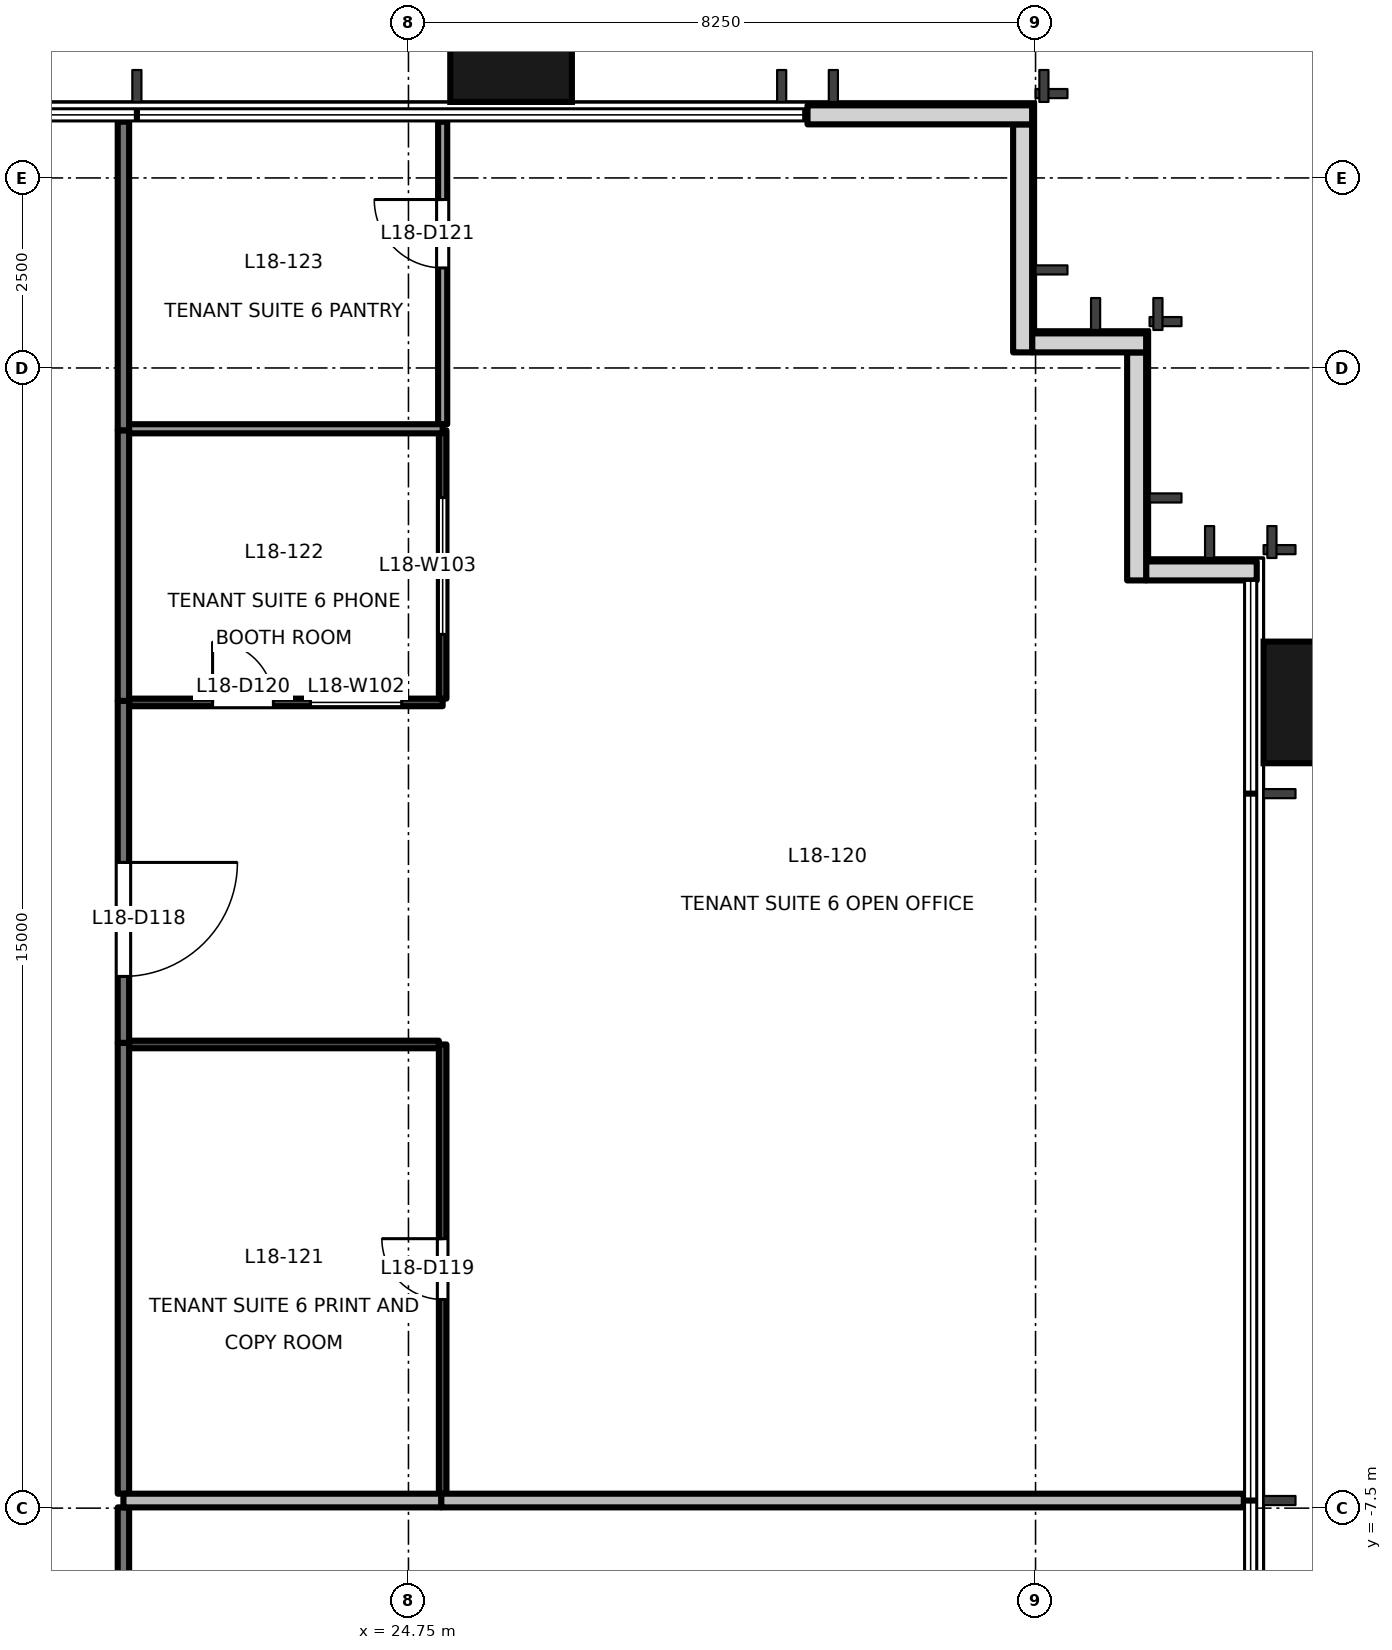
"""IFC4 building model, lengths in metres.
Left out: names, types, materials, properties, quantities, classifications, styles, units other than length and angle.
Written with IfcOpenShell. Run it as: python <this file> out.ifc"""

import sys

from ifc_helpers import new_model, si_unit, direction, frame, frame_2d, origin, origin_2d, place, context, subcontext, project, spatial, rectangle, extrude, element, fill, save


model = new_model("IFC4")
c1 = context("Model", 3, precision=1e-05, world=origin(), true_north=direction((0.0, 1.0)))
c2 = subcontext(c1, "Body", "Model", "MODEL_VIEW")
j1 = project(units=[si_unit("LENGTHUNIT", "METRE"), si_unit("PLANEANGLEUNIT", "RADIAN")], contexts=[c1])
p1 = place(None, origin())
s1 = spatial("IfcSite", under=j1, at=p1, CompositionType="ELEMENT")
p2 = place(p1, origin())
s2 = spatial("IfcBuilding", under=s1, at=p2, CompositionType="ELEMENT")
p3 = place(p2, frame((0.0, 0.0, 83.7)))
s3 = spatial("IfcBuildingStorey", under=s2, at=p3, CompositionType="ELEMENT", Elevation=83.7)
for number, where, z_axis, x_axis in (
    (1, (36.9, 3.1, -0.2), (0.0, 0.0, 1.0), (0.0, 1.0, 0.0)),
    (2, (26.1, 11.9, -0.2), (0.0, 0.0, 1.0), (1.0, 0.0, 0.0)),
):
    element("IfcColumn", number, at=place(p3, frame(where, z_axis=z_axis, x_axis=x_axis)), inside=s3, PredefinedType="COLUMN", context=c2, shape_type="SweptSolid", body=[
        extrude(rectangle(XDim=1.6, YDim=1.8, at=origin_2d()), origin(), (0.0, 0.0, 1.0), 4.0),
    ])
p4 = place(p3, frame((35.91, 4.83, 0.0), z_axis=(0.0, 0.0, 1.0), x_axis=(-1.0, 0.0, 0.0)))
e3 = element("IfcWall", 3, at=p4, inside=s3, PredefinedType="SOLIDWALL", context=c2, shape_type="SweptSolid", body=[
    extrude(rectangle(XDim=1.455, YDim=0.25, at=frame_2d((0.728, 0.0))), origin(), (0.0, 0.0, 1.0), 3.8),
])
p5 = place(p3, frame((34.33, 4.705, 0.0), z_axis=(0.0, 0.0, 1.0), x_axis=(0.0, 1.0, 0.0)))
e4 = element("IfcWall", 4, at=p5, inside=s3, PredefinedType="SOLIDWALL", context=c2, shape_type="SweptSolid", body=[
    extrude(rectangle(XDim=3.0, YDim=0.25, at=frame_2d((1.5, 0.0))), origin(), (0.0, 0.0, 1.0), 3.8),
])
p6 = place(p3, frame((34.455, 7.83, 0.0), z_axis=(0.0, 0.0, 1.0), x_axis=(-1.0, 0.0, 0.0)))
e5 = element("IfcWall", 5, at=p6, inside=s3, PredefinedType="SOLIDWALL", context=c2, shape_type="SweptSolid", body=[
    extrude(rectangle(XDim=1.5, YDim=0.25, at=frame_2d((0.75, 0.0))), origin(), (0.0, 0.0, 1.0), 3.8),
])
p7 = place(p3, frame((32.83, 7.705, 0.0), z_axis=(0.0, 0.0, 1.0), x_axis=(0.0, 1.0, 0.0)))
e6 = element("IfcWall", 6, at=p7, inside=s3, PredefinedType="SOLIDWALL", context=c2, shape_type="SweptSolid", body=[
    extrude(rectangle(XDim=3.0, YDim=0.25, at=frame_2d((1.5, 0.0))), origin(), (0.0, 0.0, 1.0), 3.8),
])
p8 = place(p3, frame((32.955, 10.83, 0.0), z_axis=(0.0, 0.0, 1.0), x_axis=(-1.0, 0.0, 0.0)))
e7 = element("IfcWall", 7, at=p8, inside=s3, PredefinedType="SOLIDWALL", context=c2, shape_type="SweptSolid", body=[
    extrude(rectangle(XDim=2.955, YDim=0.25, at=frame_2d((1.478, 0.0))), origin(), (0.0, 0.0, 1.0), 3.8),
])
p9 = place(p3, frame((21.0, -7.49, 0.0), z_axis=(0.0, 0.0, 1.0), x_axis=(0.0, -1.0, 0.0)))
e8 = element("IfcWall", 8, at=p9, inside=s3, PredefinedType="PARTITIONING", context=c2, shape_type="SweptSolid", body=[
    extrude(rectangle(XDim=3.61, YDim=0.15, at=frame_2d((1.805, 0.0))), origin(), (0.0, 0.0, 1.0), 2.9),
])
p10 = place(p9, frame((1.458, 0.0, 0.0)))
e9 = element("IfcOpeningElement", 9, at=p10, cuts=e8, PredefinedType="OPENING", context=c2, shape_type="SweptSolid", body=[
    extrude(rectangle(XDim=1.5, YDim=2.1, at=frame_2d((0.75, 1.05))), frame((0.0, 0.085, 0.0), z_axis=(0.0, -1.0, 0.0), x_axis=(1.0, 0.0, 0.0)), (0.0, 0.0, 1.0), 0.171),
])
p11 = place(p3, frame((21.0, 3.12, 0.0), z_axis=(0.0, 0.0, 1.0), x_axis=(0.0, -1.0, 0.0)))
e10 = element("IfcWall", 10, at=p11, inside=s3, PredefinedType="PARTITIONING", context=c2, shape_type="SweptSolid", body=[
    extrude(rectangle(XDim=4.5, YDim=0.15, at=frame_2d((2.25, 0.0))), origin(), (0.0, 0.0, 1.0), 2.9),
])
p12 = place(p11, frame((2.125, 0.0, 0.0)))
e11 = element("IfcOpeningElement", 11, at=p12, cuts=e10, PredefinedType="OPENING", context=c2, shape_type="SweptSolid", body=[
    extrude(rectangle(XDim=1.5, YDim=2.1, at=frame_2d((0.75, 1.05))), frame((0.0, 0.085, 0.0), z_axis=(0.0, -1.0, 0.0), x_axis=(1.0, 0.0, 0.0)), (0.0, 0.0, 1.0), 0.171),
])
p13 = place(p3, frame((21.0, -1.38, 0.0), z_axis=(0.0, 0.0, 1.0), x_axis=(0.0, -1.0, 0.0)))
e12 = element("IfcWall", 12, at=p13, inside=s3, PredefinedType="PARTITIONING", context=c2, shape_type="SweptSolid", body=[
    extrude(rectangle(XDim=5.93, YDim=0.15, at=frame_2d((2.965, 0.0))), origin(), (0.0, 0.0, 1.0), 2.9),
])
p14 = place(p3, frame((21.0, 6.68, 0.0), z_axis=(0.0, 0.0, 1.0), x_axis=(0.0, -1.0, 0.0)))
e13 = element("IfcWall", 13, at=p14, inside=s3, PredefinedType="PARTITIONING", context=c2, shape_type="SweptSolid", body=[
    extrude(rectangle(XDim=3.56, YDim=0.15, at=frame_2d((1.78, 0.0))), origin(), (0.0, 0.0, 1.0), 2.9),
])
p15 = place(p3, frame((21.0, 10.74, 0.0), z_axis=(0.0, 0.0, 1.0), x_axis=(0.0, -1.0, 0.0)))
e14 = element("IfcWall", 14, at=p15, inside=s3, PredefinedType="PARTITIONING", context=c2, shape_type="SweptSolid", body=[
    extrude(rectangle(XDim=4.06, YDim=0.15, at=frame_2d((2.03, 0.0))), origin(), (0.0, 0.0, 1.0), 3.8),
])
p16 = place(p3, frame((25.18, -7.4, 0.0), z_axis=(0.0, 0.0, 1.0), x_axis=(1.0, 0.0, 0.0)))
e15 = element("IfcWall", 15, at=p16, inside=s3, PredefinedType="PARTITIONING", context=c2, shape_type="SweptSolid", body=[
    extrude(rectangle(XDim=10.56, YDim=0.18, at=frame_2d((5.28, 0.0))), origin(), (0.0, 0.0, 1.0), 3.8),
])
p17 = place(p3, frame((21.0, -7.4, 0.0), z_axis=(0.0, 0.0, 1.0), x_axis=(1.0, 0.0, 0.0)))
e16 = element("IfcWall", 16, at=p17, inside=s3, PredefinedType="PARTITIONING", context=c2, shape_type="SweptSolid", body=[
    extrude(rectangle(XDim=4.18, YDim=0.18, at=frame_2d((2.09, 0.0))), origin(), (0.0, 0.0, 1.0), 3.8),
])
p18 = place(p3, frame((25.15, -1.4, 0.0), z_axis=(0.0, 0.0, 1.0), x_axis=(-1.0, 0.0, 0.0)))
e17 = element("IfcWall", 17, at=p18, inside=s3, PredefinedType="PARTITIONING", context=c2, shape_type="SweptSolid", body=[
    extrude(rectangle(XDim=4.075, YDim=0.1, at=frame_2d((2.038, 0.0))), origin(), (0.0, 0.0, 1.0), 3.8),
])
p19 = place(p3, frame((25.2, -7.31, 0.0), z_axis=(0.0, 0.0, 1.0), x_axis=(0.0, 1.0, 0.0)))
e18 = element("IfcWall", 18, at=p19, inside=s3, PredefinedType="PARTITIONING", context=c2, shape_type="SweptSolid", body=[
    extrude(rectangle(XDim=5.91, YDim=0.1, at=frame_2d((2.955, 0.0))), origin(), (0.0, 0.0, 1.0), 2.9),
])
p20 = place(p19, frame((2.555, 0.0, 0.0)))
e19 = element("IfcOpeningElement", 19, at=p20, cuts=e18, PredefinedType="OPENING", context=c2, shape_type="SweptSolid", body=[
    extrude(rectangle(XDim=0.8, YDim=2.1, at=frame_2d((0.4, 1.05))), frame((0.0, 0.061, 0.0), z_axis=(0.0, -1.0, 0.0), x_axis=(1.0, 0.0, 0.0)), (0.0, 0.0, 1.0), 0.121),
])
p21 = place(p3, frame((21.075, 3.1, 0.0), z_axis=(0.0, 0.0, 1.0), x_axis=(1.0, 0.0, 0.0)))
e20 = element("IfcWall", 20, at=p21, inside=s3, PredefinedType="PARTITIONING", context=c2, shape_type="SweptSolid", body=[
    extrude(rectangle(XDim=4.125, YDim=0.1, at=frame_2d((2.062, 0.0))), origin(), (0.0, 0.0, 1.0), 3.8),
])
p22 = place(p21, frame((1.098, 0.0, 0.0)))
e21 = element("IfcOpeningElement", 21, at=p22, cuts=e20, PredefinedType="OPENING", context=c2, shape_type="SweptSolid", body=[
    extrude(rectangle(XDim=0.8, YDim=2.1, at=frame_2d((0.4, 1.05))), frame((0.0, 0.061, 0.0), z_axis=(0.0, -1.0, 0.0), x_axis=(1.0, 0.0, 0.0)), (0.0, 0.0, 1.0), 0.121),
])
p23 = place(p21, frame((2.386, 0.0, 0.9)))
e22 = element("IfcOpeningElement", 22, at=p23, cuts=e20, PredefinedType="OPENING", context=c2, shape_type="SweptSolid", body=[
    extrude(rectangle(XDim=1.2, YDim=1.2, at=frame_2d((0.6, 0.6))), frame((0.0, 0.061, 0.0), z_axis=(0.0, -1.0, 0.0), x_axis=(1.0, 0.0, 0.0)), (0.0, 0.0, 1.0), 0.121),
])
p24 = place(p3, frame((25.2, 3.15, 0.0), z_axis=(0.0, 0.0, 1.0), x_axis=(0.0, 1.0, 0.0)))
e23 = element("IfcWall", 23, at=p24, inside=s3, PredefinedType="PARTITIONING", context=c2, shape_type="SweptSolid", body=[
    extrude(rectangle(XDim=3.53, YDim=0.1, at=frame_2d((1.765, 0.0))), origin(), (0.0, 0.0, 1.0), 2.9),
])
p25 = place(p24, frame((0.845, 0.0, 0.9)))
e24 = element("IfcOpeningElement", 24, at=p25, cuts=e23, PredefinedType="OPENING", context=c2, shape_type="SweptSolid", body=[
    extrude(rectangle(XDim=1.8, YDim=1.2, at=frame_2d((0.9, 0.6))), frame((0.0, 0.061, 0.0), z_axis=(0.0, -1.0, 0.0), x_axis=(1.0, 0.0, 0.0)), (0.0, 0.0, 1.0), 0.121),
])
p26 = place(p3, frame((25.2, 6.76, 0.0), z_axis=(0.0, 0.0, 1.0), x_axis=(0.0, 1.0, 0.0)))
e25 = element("IfcWall", 25, at=p26, inside=s3, PredefinedType="PARTITIONING", context=c2, shape_type="SweptSolid", body=[
    extrude(rectangle(XDim=3.98, YDim=0.12, at=frame_2d((1.99, 0.0))), origin(), (0.0, 0.0, 1.0), 3.8),
])
p27 = place(p26, frame((2.056, 0.0, 0.0)))
e26 = element("IfcOpeningElement", 26, at=p27, cuts=e25, PredefinedType="OPENING", context=c2, shape_type="SweptSolid", body=[
    extrude(rectangle(XDim=0.9, YDim=2.1, at=frame_2d((0.45, 1.05))), frame((0.0, 0.071, 0.0), z_axis=(0.0, -1.0, 0.0), x_axis=(1.0, 0.0, 0.0)), (0.0, 0.0, 1.0), 0.141),
])
p28 = place(p3, frame((21.075, 6.7, 0.0), z_axis=(0.0, 0.0, 1.0), x_axis=(1.0, 0.0, 0.0)))
e27 = element("IfcWall", 27, at=p28, inside=s3, PredefinedType="PARTITIONING", context=c2, shape_type="SweptSolid", body=[
    extrude(rectangle(XDim=4.125, YDim=0.12, at=frame_2d((2.062, 0.0))), origin(), (0.0, 0.0, 1.0), 3.8),
])
p29 = place(p12, origin())
e28 = element("IfcDoor", 28, at=p29, inside=s3, OperationType="DOUBLE_DOOR_SINGLE_SWING", PredefinedType="DOOR", context=c2, shape_type="SweptSolid", body=[
    extrude(rectangle(XDim=1.5, YDim=2.1, at=frame_2d((0.75, 1.05))), frame((0.0, 0.025, 0.0), z_axis=(0.0, -1.0, 0.0), x_axis=(1.0, 0.0, 0.0)), (0.0, 0.0, 1.0), 0.05),
])
fill(e11, e28)
p30 = place(p20, origin())
e29 = element("IfcDoor", 29, at=p30, inside=s3, OperationType="SINGLE_SWING_RIGHT", PredefinedType="DOOR", context=c2, shape_type="SweptSolid", body=[
    extrude(rectangle(XDim=0.8, YDim=2.1, at=frame_2d((0.4, 1.05))), frame((0.0, 0.025, 0.0), z_axis=(0.0, -1.0, 0.0), x_axis=(1.0, 0.0, 0.0)), (0.0, 0.0, 1.0), 0.05),
])
fill(e19, e29)
p31 = place(p22, origin())
e30 = element("IfcDoor", 30, at=p31, inside=s3, OperationType="SINGLE_SWING_LEFT", PredefinedType="DOOR", context=c2, shape_type="SweptSolid", body=[
    extrude(rectangle(XDim=0.8, YDim=2.1, at=frame_2d((0.4, 1.05))), frame((0.0, 0.025, 0.0), z_axis=(0.0, -1.0, 0.0), x_axis=(1.0, 0.0, 0.0)), (0.0, 0.0, 1.0), 0.05),
])
fill(e21, e30)
p32 = place(p27, origin())
e31 = element("IfcDoor", 31, at=p32, inside=s3, OperationType="SINGLE_SWING_RIGHT", PredefinedType="DOOR", context=c2, shape_type="SweptSolid", body=[
    extrude(rectangle(XDim=0.9, YDim=2.1, at=frame_2d((0.45, 1.05))), frame((0.0, 0.025, 0.0), z_axis=(0.0, -1.0, 0.0), x_axis=(1.0, 0.0, 0.0)), (0.0, 0.0, 1.0), 0.05),
])
fill(e26, e31)
p33 = place(p23, origin())
e32 = element("IfcWindow", 32, at=p33, inside=s3, PartitioningType="SINGLE_PANEL", PredefinedType="WINDOW", context=c2, shape_type="SweptSolid", body=[
    extrude(rectangle(XDim=1.2, YDim=1.2, at=frame_2d((0.6, 0.6))), frame((0.0, 0.03, 0.0), z_axis=(0.0, -1.0, 0.0), x_axis=(1.0, 0.0, 0.0)), (0.0, 0.0, 1.0), 0.06),
])
fill(e22, e32)
p34 = place(p25, origin())
e33 = element("IfcWindow", 33, at=p34, inside=s3, PartitioningType="SINGLE_PANEL", PredefinedType="WINDOW", context=c2, shape_type="SweptSolid", body=[
    extrude(rectangle(XDim=1.8, YDim=1.2, at=frame_2d((0.9, 0.6))), frame((0.0, 0.03, 0.0), z_axis=(0.0, -1.0, 0.0), x_axis=(1.0, 0.0, 0.0)), (0.0, 0.0, 1.0), 0.06),
])
fill(e24, e33)
save(model, sys.argv[1])
